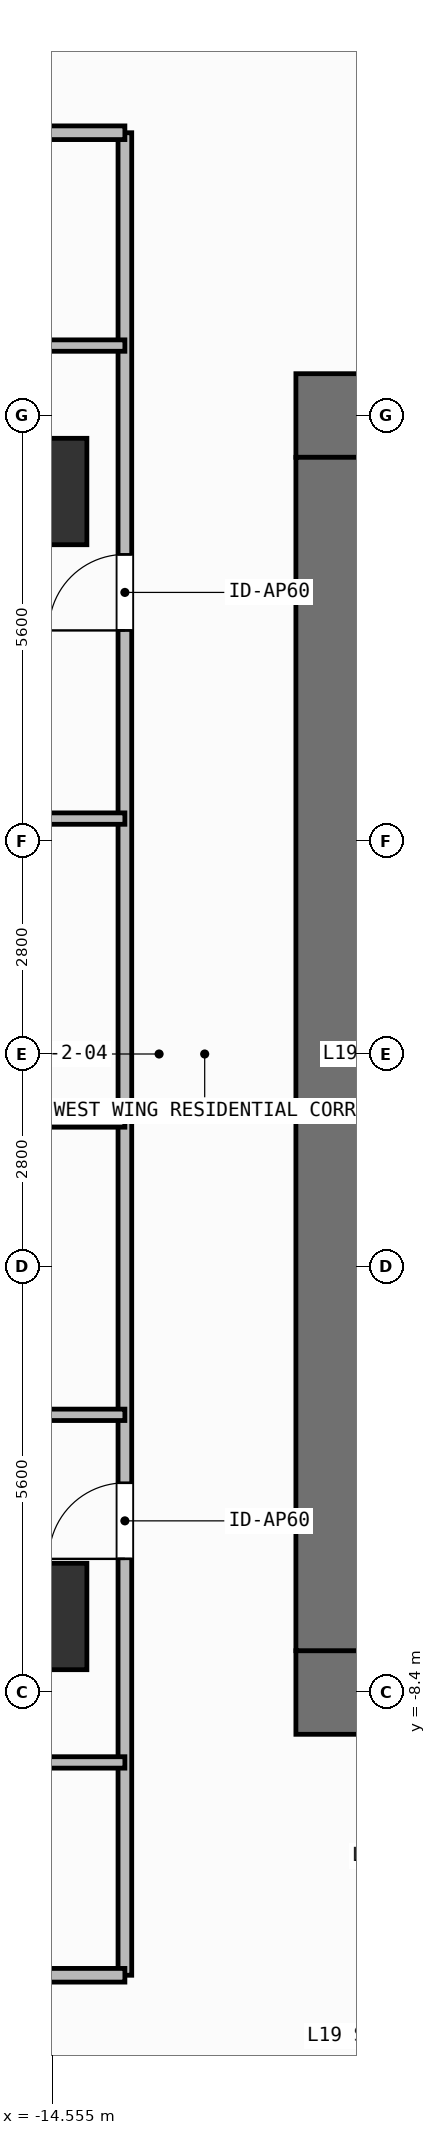
"""IFC4 building model, lengths in metres.
Left out: names, types, materials, properties, quantities, classifications, styles, units other than length and angle.
Written with IfcOpenShell. Run it as: python <this file> out.ifc"""

import sys

from ifc_helpers import new_model, si_unit, direction, frame, frame_2d, origin, origin_2d, place, context, subcontext, project, spatial, rectangle, extrude, element, fill, save


model = new_model("IFC4")
c1 = context("Model", 3, precision=1e-05, world=origin(), true_north=direction((0.0, 1.0)))
c2 = subcontext(c1, "Body", "Model", "MODEL_VIEW")
j1 = project(units=[si_unit("LENGTHUNIT", "METRE"), si_unit("PLANEANGLEUNIT", "RADIAN")], contexts=[c1])
p1 = place(None, origin())
s1 = spatial("IfcSite", under=j1, at=p1, CompositionType="ELEMENT")
p2 = place(p1, origin())
s2 = spatial("IfcBuilding", under=s1, at=p2, CompositionType="ELEMENT")
p3 = place(p2, frame((0.0, 0.0, 73.5)))
s3 = spatial("IfcBuildingStorey", under=s2, at=p3, CompositionType="ELEMENT", Elevation=73.5)
for number, where, z_axis, x_axis in (
    (1, (-11.35, -8.4, 0.0), (0.0, 0.0, 1.0), (1.0, 0.0, 0.0)),
    (2, (-11.35, 8.4, 0.0), (0.0, 0.0, 1.0), (1.0, 0.0, 0.0)),
):
    element("IfcWall", number, at=place(p3, frame(where, z_axis=z_axis, x_axis=x_axis)), inside=s3, PredefinedType="SHEAR", context=c2, shape_type="SweptSolid", body=[
        extrude(rectangle(XDim=1.65, YDim=1.1, at=frame_2d((0.825, 0.0))), origin(), (0.0, 0.0, 1.0), 3.9),
    ])
p4 = place(p3, frame((-10.8, -7.85, 0.0), z_axis=(0.0, 0.0, 1.0), x_axis=(0.0, 1.0, 0.0)))
e3 = element("IfcWall", 3, at=p4, inside=s3, PredefinedType="SHEAR", context=c2, shape_type="SweptSolid", body=[
    extrude(rectangle(XDim=15.7, YDim=1.1, at=frame_2d((7.85, 0.0))), origin(), (0.0, 0.0, 1.0), 3.9),
])
for number, where, z_axis, x_axis in (
    (4, (-14.8, -7.4, 0.0), (0.0, 0.0, 1.0), (1.0, 0.0, 0.0)),
    (5, (-14.8, 7.4, 0.0), (0.0, 0.0, 1.0), (1.0, 0.0, 0.0)),
):
    element("IfcColumn", number, at=place(p3, frame(where, z_axis=z_axis, x_axis=x_axis)), inside=s3, PredefinedType="COLUMN", context=c2, shape_type="SweptSolid", body=[
        extrude(rectangle(XDim=1.4, YDim=1.4, at=origin_2d()), origin(), (0.0, 0.0, 1.0), 3.9),
    ])
p5 = place(p3, frame((-13.6, -12.12, 0.0), z_axis=(0.0, 0.0, 1.0), x_axis=(0.0, 1.0, 0.0)))
e6 = element("IfcWall", 6, at=p5, inside=s3, PredefinedType="PARTITIONING", context=c2, shape_type="SweptSolid", body=[
    extrude(rectangle(XDim=11.247, YDim=0.18, at=frame_2d((5.624, 0.0))), origin(), (0.0, 0.0, 1.0), 3.6),
])
p6 = place(p5, frame((5.478, 0.0, 0.0)))
e7 = element("IfcOpeningElement", 7, at=p6, cuts=e6, PredefinedType="OPENING", context=c2, shape_type="SweptSolid", body=[
    extrude(rectangle(XDim=1.0, YDim=2.2, at=frame_2d((0.5, 1.1))), frame((0.0, 0.1, 0.0), z_axis=(0.0, -1.0, 0.0), x_axis=(1.0, 0.0, 0.0)), (0.0, 0.0, 1.0), 0.2),
])
p7 = place(p3, frame((-19.553, -4.747, 0.0), z_axis=(0.0, 0.0, 1.0), x_axis=(1.0, 0.0, 0.0)))
e8 = element("IfcWall", 8, at=p7, inside=s3, PredefinedType="PARTITIONING", context=c2, shape_type="SweptSolid", body=[
    extrude(rectangle(XDim=5.953, YDim=0.15, at=frame_2d((2.977, 0.0))), origin(), (0.0, 0.0, 1.0), 3.6),
])
p8 = place(p7, frame((2.64, 0.0, 0.0)))
e9 = element("IfcOpeningElement", 9, at=p8, cuts=e8, PredefinedType="OPENING", context=c2, shape_type="SweptSolid", body=[
    extrude(rectangle(XDim=0.85, YDim=2.1, at=frame_2d((0.425, 1.05))), frame((0.0, 0.085, 0.0), z_axis=(0.0, -1.0, 0.0), x_axis=(1.0, 0.0, 0.0)), (0.0, 0.0, 1.0), 0.17),
])
p9 = place(p3, frame((-23.69, -9.32, 0.0), z_axis=(0.0, 0.0, 1.0), x_axis=(1.0, 0.0, 0.0)))
e10 = element("IfcWall", 10, at=p9, inside=s3, PredefinedType="PARTITIONING", context=c2, shape_type="SweptSolid", body=[
    extrude(rectangle(XDim=10.09, YDim=0.15, at=frame_2d((5.045, 0.0))), origin(), (0.0, 0.0, 1.0), 3.6),
])
p10 = place(p9, frame((5.512, 0.0, 0.0)))
e11 = element("IfcOpeningElement", 11, at=p10, cuts=e10, PredefinedType="OPENING", context=c2, shape_type="SweptSolid", body=[
    extrude(rectangle(XDim=0.85, YDim=2.1, at=frame_2d((0.425, 1.05))), frame((0.0, 0.085, 0.0), z_axis=(0.0, -1.0, 0.0), x_axis=(1.0, 0.0, 0.0)), (0.0, 0.0, 1.0), 0.17),
])
p11 = place(p3, frame((-13.6, -0.873, 0.0), z_axis=(0.0, 0.0, 1.0), x_axis=(0.0, 1.0, 0.0)))
e12 = element("IfcWall", 12, at=p11, inside=s3, PredefinedType="PARTITIONING", context=c2, shape_type="SweptSolid", body=[
    extrude(rectangle(XDim=12.993, YDim=0.18, at=frame_2d((6.497, 0.0))), origin(), (0.0, 0.0, 1.0), 3.6),
])
p12 = place(p11, frame((6.446, 0.0, 0.0)))
e13 = element("IfcOpeningElement", 13, at=p12, cuts=e12, PredefinedType="OPENING", context=c2, shape_type="SweptSolid", body=[
    extrude(rectangle(XDim=1.0, YDim=2.2, at=frame_2d((0.5, 1.1))), frame((0.0, 0.1, 0.0), z_axis=(0.0, -1.0, 0.0), x_axis=(1.0, 0.0, 0.0)), (0.0, 0.0, 1.0), 0.2),
])
p13 = place(p3, frame((-19.553, 9.32, 0.0), z_axis=(0.0, 0.0, 1.0), x_axis=(1.0, 0.0, 0.0)))
e14 = element("IfcWall", 14, at=p13, inside=s3, PredefinedType="PARTITIONING", context=c2, shape_type="SweptSolid", body=[
    extrude(rectangle(XDim=5.953, YDim=0.15, at=frame_2d((2.977, 0.0))), origin(), (0.0, 0.0, 1.0), 3.6),
])
p14 = place(p13, frame((2.64, 0.0, 0.0)))
e15 = element("IfcOpeningElement", 15, at=p14, cuts=e14, PredefinedType="OPENING", context=c2, shape_type="SweptSolid", body=[
    extrude(rectangle(XDim=0.85, YDim=2.1, at=frame_2d((0.425, 1.05))), frame((0.0, 0.085, 0.0), z_axis=(0.0, -1.0, 0.0), x_axis=(1.0, 0.0, 0.0)), (0.0, 0.0, 1.0), 0.17),
])
p15 = place(p3, frame((-23.69, 3.097, 0.0), z_axis=(0.0, 0.0, 1.0), x_axis=(1.0, 0.0, 0.0)))
e16 = element("IfcWall", 16, at=p15, inside=s3, PredefinedType="PARTITIONING", context=c2, shape_type="SweptSolid", body=[
    extrude(rectangle(XDim=10.09, YDim=0.15, at=frame_2d((5.045, 0.0))), origin(), (0.0, 0.0, 1.0), 3.6),
])
p16 = place(p15, frame((4.62, 0.0, 0.0)))
e17 = element("IfcOpeningElement", 17, at=p16, cuts=e16, PredefinedType="OPENING", context=c2, shape_type="SweptSolid", body=[
    extrude(rectangle(XDim=0.85, YDim=2.1, at=frame_2d((0.425, 1.05))), frame((0.0, 0.085, 0.0), z_axis=(0.0, -1.0, 0.0), x_axis=(1.0, 0.0, 0.0)), (0.0, 0.0, 1.0), 0.17),
])
for number, where, z_axis, x_axis in (
    (18, (-27.93, -0.873, 0.0), (0.0, 0.0, 1.0), (1.0, 0.0, 0.0)),
    (19, (-27.93, -12.12, 0.0), (0.0, 0.0, 1.0), (1.0, 0.0, 0.0)),
    (20, (-27.93, 12.12, 0.0), (0.0, 0.0, 1.0), (1.0, 0.0, 0.0)),
):
    element("IfcWall", number, at=place(p3, frame(where, z_axis=z_axis, x_axis=x_axis)), inside=s3, PredefinedType="PARTITIONING", context=c2, shape_type="SweptSolid", body=[
        extrude(rectangle(XDim=14.33, YDim=0.18, at=frame_2d((7.165, 0.0))), origin(), (0.0, 0.0, 1.0), 3.6),
    ])
p17 = place(p6, origin())
e21 = element("IfcDoor", 21, at=p17, inside=s3, OperationType="SINGLE_SWING_LEFT", PredefinedType="DOOR", context=c2, shape_type="SweptSolid", body=[
    extrude(rectangle(XDim=1.0, YDim=2.2, at=frame_2d((0.5, 1.1))), frame((0.0, 0.025, 0.0), z_axis=(0.0, -1.0, 0.0), x_axis=(1.0, 0.0, 0.0)), (0.0, 0.0, 1.0), 0.05),
])
fill(e7, e21)
p18 = place(p12, origin())
e22 = element("IfcDoor", 22, at=p18, inside=s3, OperationType="SINGLE_SWING_LEFT", PredefinedType="DOOR", context=c2, shape_type="SweptSolid", body=[
    extrude(rectangle(XDim=1.0, YDim=2.2, at=frame_2d((0.5, 1.1))), frame((0.0, 0.025, 0.0), z_axis=(0.0, -1.0, 0.0), x_axis=(1.0, 0.0, 0.0)), (0.0, 0.0, 1.0), 0.05),
])
fill(e13, e22)
save(model, sys.argv[1])
